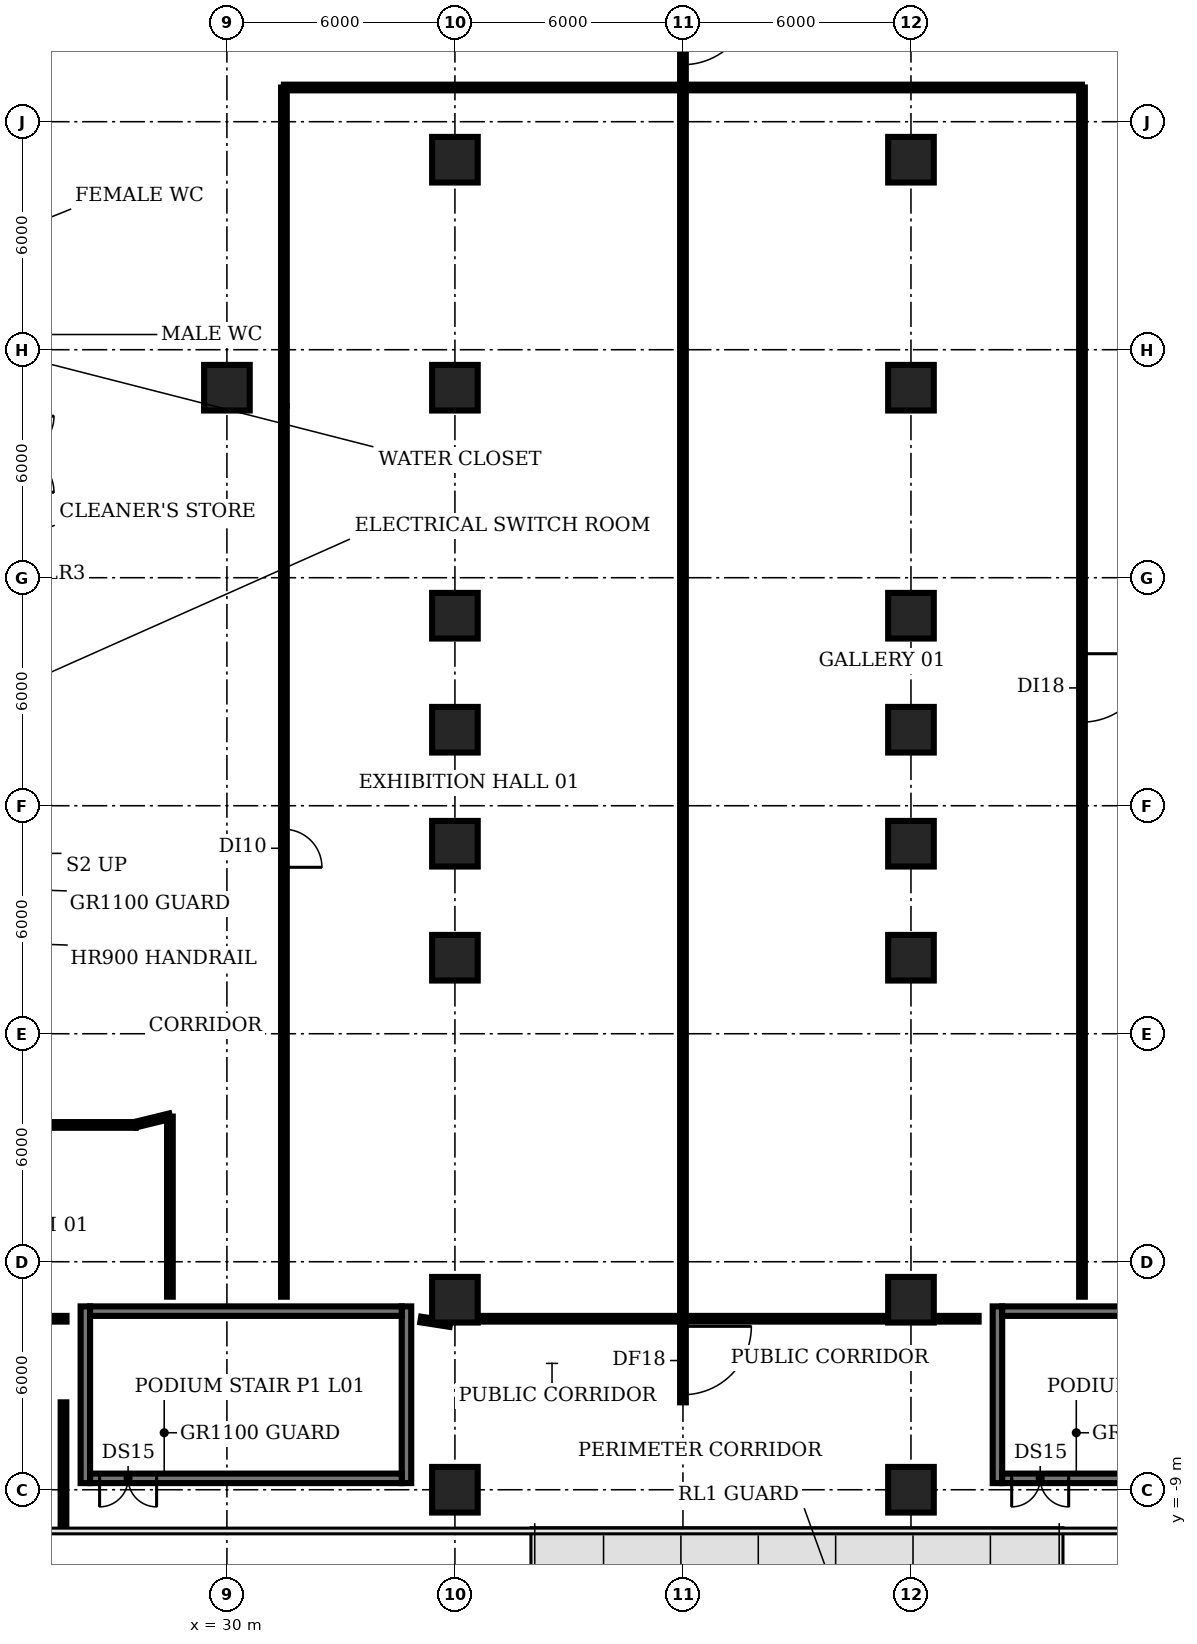
"""IFC4 building model, lengths in metres.
Left out: names, types, materials, properties, quantities, classifications, styles, units other than length and angle.
Written with IfcOpenShell. Run it as: python <this file> out.ifc"""

import sys

from ifc_helpers import new_model, si_unit, direction, frame, frame_2d, origin, origin_2d, place, context, subcontext, project, spatial, rectangle, extrude, element, fill, save


model = new_model("IFC4")
c1 = context("Model", 3, precision=1e-05, world=origin(), true_north=direction((0.0, 1.0)))
c2 = subcontext(c1, "Body", "Model", "MODEL_VIEW")
j1 = project(units=[si_unit("LENGTHUNIT", "METRE"), si_unit("PLANEANGLEUNIT", "RADIAN")], contexts=[c1])
p1 = place(None, origin())
s1 = spatial("IfcSite", under=j1, at=p1, CompositionType="ELEMENT")
p2 = place(p1, origin())
s2 = spatial("IfcBuilding", under=s1, at=p2, CompositionType="ELEMENT")
p3 = place(p2, frame((0.0, 0.0, 6.0)))
s3 = spatial("IfcBuildingStorey", under=s2, at=p3, CompositionType="ELEMENT", Elevation=6.0)
for number, where, z_axis, x_axis in (
    (1, (30.0, 20.0, 0.0), (0.0, 0.0, 1.0), (1.0, 0.0, 0.0)),
    (2, (36.0, -9.0, 0.0), (0.0, 0.0, 1.0), (1.0, 0.0, 0.0)),
    (3, (36.0, -4.0, 0.0), (0.0, 0.0, 1.0), (1.0, 0.0, 0.0)),
    (4, (36.0, 5.0, 0.0), (0.0, 0.0, 1.0), (1.0, 0.0, 0.0)),
    (5, (36.0, 8.0, 0.0), (0.0, 0.0, 1.0), (1.0, 0.0, 0.0)),
    (6, (36.0, 11.0, 0.0), (0.0, 0.0, 1.0), (1.0, 0.0, 0.0)),
    (7, (36.0, 14.0, 0.0), (0.0, 0.0, 1.0), (1.0, 0.0, 0.0)),
    (8, (36.0, 20.0, 0.0), (0.0, 0.0, 1.0), (1.0, 0.0, 0.0)),
    (9, (36.0, 26.0, 0.0), (0.0, 0.0, 1.0), (1.0, 0.0, 0.0)),
    (10, (48.0, -9.0, 0.0), (0.0, 0.0, 1.0), (1.0, 0.0, 0.0)),
    (11, (48.0, -4.0, 0.0), (0.0, 0.0, 1.0), (1.0, 0.0, 0.0)),
    (12, (48.0, 5.0, 0.0), (0.0, 0.0, 1.0), (1.0, 0.0, 0.0)),
    (13, (48.0, 8.0, 0.0), (0.0, 0.0, 1.0), (1.0, 0.0, 0.0)),
    (14, (48.0, 11.0, 0.0), (0.0, 0.0, 1.0), (1.0, 0.0, 0.0)),
    (15, (48.0, 14.0, 0.0), (0.0, 0.0, 1.0), (1.0, 0.0, 0.0)),
    (16, (48.0, 20.0, 0.0), (0.0, 0.0, 1.0), (1.0, 0.0, 0.0)),
    (17, (48.0, 26.0, 0.0), (0.0, 0.0, 1.0), (1.0, 0.0, 0.0)),
):
    element("IfcColumn", number, at=place(p3, frame(where, z_axis=z_axis, x_axis=x_axis)), inside=s3, PredefinedType="COLUMN", context=c2, shape_type="SweptSolid", body=[
        extrude(rectangle(XDim=1.2, YDim=1.2, at=origin_2d()), origin(), (0.0, 0.0, 1.0), 4.6),
    ])
for number, where, z_axis, x_axis in (
    (18, (26.275, -8.825, 0.0), (0.0, 0.0, 1.0), (0.0, 1.0, 0.0)),
    (19, (34.725, -8.825, 0.0), (0.0, 0.0, 1.0), (0.0, 1.0, 0.0)),
):
    element("IfcWall", number, at=place(p3, frame(where, z_axis=z_axis, x_axis=x_axis)), inside=s3, PredefinedType="SHEAR", context=c2, shape_type="SweptSolid", body=[
        extrude(rectangle(XDim=4.65, YDim=0.25, at=frame_2d((2.325, 0.0))), origin(), (0.0, 0.0, 1.0), 4.6),
    ])
p4 = place(p3, frame((34.6, -8.7, 0.0), z_axis=(0.0, 0.0, 1.0), x_axis=(-1.0, 0.0, 0.0)))
e20 = element("IfcWall", 20, at=p4, inside=s3, PredefinedType="SHEAR", context=c2, shape_type="SweptSolid", body=[
    extrude(rectangle(XDim=8.2, YDim=0.25, at=frame_2d((4.1, 0.0))), origin(), (0.0, 0.0, 1.0), 4.6),
])
p5 = place(p4, frame((6.45, 0.0, 0.0)))
e21 = element("IfcOpeningElement", 21, at=p5, cuts=e20, PredefinedType="OPENING", context=c2, shape_type="SweptSolid", body=[
    extrude(rectangle(XDim=1.5, YDim=2.1, at=frame_2d((0.75, 1.05))), frame((0.0, 0.135, 0.0), z_axis=(0.0, -1.0, 0.0), x_axis=(1.0, 0.0, 0.0)), (0.0, 0.0, 1.0), 0.27),
])
p6 = place(p3, frame((26.4, -4.3, 0.0), z_axis=(0.0, 0.0, 1.0), x_axis=(1.0, 0.0, 0.0)))
e22 = element("IfcWall", 22, at=p6, inside=s3, PredefinedType="SHEAR", context=c2, shape_type="SweptSolid", body=[
    extrude(rectangle(XDim=8.2, YDim=0.25, at=frame_2d((4.1, 0.0))), origin(), (0.0, 0.0, 1.0), 4.6),
])
p7 = place(p3, frame((50.275, -8.825, 0.0), z_axis=(0.0, 0.0, 1.0), x_axis=(0.0, 1.0, 0.0)))
e23 = element("IfcWall", 23, at=p7, inside=s3, PredefinedType="SHEAR", context=c2, shape_type="SweptSolid", body=[
    extrude(rectangle(XDim=4.65, YDim=0.25, at=frame_2d((2.325, 0.0))), origin(), (0.0, 0.0, 1.0), 4.6),
])
p8 = place(p3, frame((58.6, -8.7, 0.0), z_axis=(0.0, 0.0, 1.0), x_axis=(-1.0, 0.0, 0.0)))
e24 = element("IfcWall", 24, at=p8, inside=s3, PredefinedType="SHEAR", context=c2, shape_type="SweptSolid", body=[
    extrude(rectangle(XDim=8.2, YDim=0.25, at=frame_2d((4.1, 0.0))), origin(), (0.0, 0.0, 1.0), 4.6),
])
p9 = place(p8, frame((6.45, 0.0, 0.0)))
e25 = element("IfcOpeningElement", 25, at=p9, cuts=e24, PredefinedType="OPENING", context=c2, shape_type="SweptSolid", body=[
    extrude(rectangle(XDim=1.5, YDim=2.1, at=frame_2d((0.75, 1.05))), frame((0.0, 0.135, 0.0), z_axis=(0.0, -1.0, 0.0), x_axis=(1.0, 0.0, 0.0)), (0.0, 0.0, 1.0), 0.27),
])
p10 = place(p3, frame((50.4, -4.3, 0.0), z_axis=(0.0, 0.0, 1.0), x_axis=(1.0, 0.0, 0.0)))
e26 = element("IfcWall", 26, at=p10, inside=s3, PredefinedType="SHEAR", context=c2, shape_type="SweptSolid", body=[
    extrude(rectangle(XDim=8.2, YDim=0.25, at=frame_2d((4.1, 0.0))), origin(), (0.0, 0.0, 1.0), 4.6),
])
p11 = place(p3, frame((24.46, -4.5, 0.0), z_axis=(0.0, 0.0, 1.0), x_axis=(1.0, 0.0, 0.0)))
e27 = element("IfcWall", 27, at=p11, inside=s3, PredefinedType="PARTITIONING", context=c2, shape_type="SweptSolid", body=[
    extrude(rectangle(XDim=1.32, YDim=0.15, at=frame_2d((0.66, 0.0))), origin(), (0.0, 0.0, 1.0), 3.18),
])
p12 = place(p3, frame((25.7, -10.03, 0.0), z_axis=(0.0, 0.0, 1.0), x_axis=(0.0, 1.0, 0.0)))
e28 = element("IfcWall", 28, at=p12, inside=s3, PredefinedType="PARTITIONING", context=c2, shape_type="SweptSolid", body=[
    extrude(rectangle(XDim=3.33, YDim=0.15, at=frame_2d((1.665, 0.0))), origin(), (0.0, 0.0, 1.0), 3.18),
])
p13 = place(p3, frame((27.6, 0.6, 0.0), z_axis=(0.0, 0.0, 1.0), x_axis=(-1.0, 0.0, 0.0)))
e29 = element("IfcWall", 29, at=p13, inside=s3, PredefinedType="PARTITIONING", context=c2, shape_type="SweptSolid", body=[
    extrude(rectangle(XDim=7.1, YDim=0.15, at=frame_2d((3.55, 0.0))), origin(), (0.0, 0.0, 1.0), 3.18),
])
p14 = place(p13, frame((3.0, 0.0, 0.0)))
e30 = element("IfcOpeningElement", 30, at=p14, cuts=e29, PredefinedType="OPENING", context=c2, shape_type="SweptSolid", body=[
    extrude(rectangle(XDim=1.2, YDim=2.1, at=frame_2d((0.6, 1.05))), frame((0.0, 0.085, 0.0), z_axis=(0.0, -1.0, 0.0), x_axis=(1.0, 0.0, 0.0)), (0.0, 0.0, 1.0), 0.17),
])
p15 = place(p3, frame((27.6, 0.61, 0.0), z_axis=(0.0, 0.0, 1.0), x_axis=(0.971400357327, 0.237447564284, 0.0)))
e31 = element("IfcWall", 31, at=p15, inside=s3, PredefinedType="PARTITIONING", context=c2, shape_type="SweptSolid", body=[
    extrude(rectangle(XDim=0.927, YDim=0.15, at=frame_2d((0.463, 0.0))), origin(), (0.0, 0.0, 1.0), 3.18),
])
p16 = place(p3, frame((28.5, -3.92, 0.0), z_axis=(0.0, 0.0, 1.0), x_axis=(0.0, 1.0, 0.0)))
e32 = element("IfcWall", 32, at=p16, inside=s3, PredefinedType="PARTITIONING", context=c2, shape_type="SweptSolid", body=[
    extrude(rectangle(XDim=4.74, YDim=0.15, at=frame_2d((2.37, 0.0))), origin(), (0.0, 0.0, 1.0), 3.18),
])
p17 = place(p3, frame((31.5, 19.52, 0.0), z_axis=(0.0, 0.0, 1.0), x_axis=(0.0, -1.0, 0.0)))
e33 = element("IfcWall", 33, at=p17, inside=s3, PredefinedType="PARTITIONING", context=c2, shape_type="SweptSolid", body=[
    extrude(rectangle(XDim=23.44, YDim=0.15, at=frame_2d((11.72, 0.0))), origin(), (0.0, 0.0, 1.0), 3.18),
])
p18 = place(p17, frame((11.14, 0.0, 0.0)))
e34 = element("IfcOpeningElement", 34, at=p18, cuts=e33, PredefinedType="OPENING", context=c2, shape_type="SweptSolid", body=[
    extrude(rectangle(XDim=1.0, YDim=2.1, at=frame_2d((0.5, 1.05))), frame((0.0, 0.085, 0.0), z_axis=(0.0, -1.0, 0.0), x_axis=(1.0, 0.0, 0.0)), (0.0, 0.0, 1.0), 0.17),
])
p19 = place(p3, frame((31.5, 19.52, 0.0), z_axis=(0.0, 0.0, 1.0), x_axis=(0.0, 1.0, 0.0)))
e35 = element("IfcWall", 35, at=p19, inside=s3, PredefinedType="PARTITIONING", context=c2, shape_type="SweptSolid", body=[
    extrude(rectangle(XDim=8.38, YDim=0.15, at=frame_2d((4.19, 0.0))), origin(), (0.0, 0.0, 1.0), 3.18),
])
p20 = place(p3, frame((31.5, 27.9, 0.0), z_axis=(0.0, 0.0, 1.0), x_axis=(1.0, 0.0, 0.0)))
e36 = element("IfcWall", 36, at=p20, inside=s3, PredefinedType="PARTITIONING", context=c2, shape_type="SweptSolid", body=[
    extrude(rectangle(XDim=21.0, YDim=0.15, at=frame_2d((10.5, 0.0))), origin(), (0.0, 0.0, 1.0), 3.18),
])
p21 = place(p3, frame((35.1, -4.52, 0.0), z_axis=(0.0, 0.0, 1.0), x_axis=(0.988098486873, -0.153822560892, 0.0)))
e37 = element("IfcWall", 37, at=p21, inside=s3, PredefinedType="PARTITIONING", context=c2, shape_type="SweptSolid", body=[
    extrude(rectangle(XDim=0.779, YDim=0.15, at=frame_2d((0.39, 0.0))), origin(), (0.0, 0.0, 1.0), 3.18),
])
p22 = place(p3, frame((36.46, -4.5, 0.0), z_axis=(0.0, 0.0, 1.0), x_axis=(1.0, 0.0, 0.0)))
e38 = element("IfcWall", 38, at=p22, inside=s3, PredefinedType="PARTITIONING", context=c2, shape_type="SweptSolid", body=[
    extrude(rectangle(XDim=11.08, YDim=0.15, at=frame_2d((5.54, 0.0))), origin(), (0.0, 0.0, 1.0), 3.18),
])
p23 = place(p3, frame((42.0, -4.5, 0.0), z_axis=(0.0, 0.0, 1.0), x_axis=(0.0, -1.0, 0.0)))
e39 = element("IfcWall", 39, at=p23, inside=s3, PredefinedType="PARTITIONING", context=c2, shape_type="SweptSolid", body=[
    extrude(rectangle(XDim=2.2, YDim=0.15, at=frame_2d((1.1, 0.0))), origin(), (0.0, 0.0, 1.0), 3.18),
])
p24 = place(p23, frame((0.2, 0.0, 0.0)))
e40 = element("IfcOpeningElement", 40, at=p24, cuts=e39, PredefinedType="OPENING", context=c2, shape_type="SweptSolid", body=[
    extrude(rectangle(XDim=1.8, YDim=2.1, at=frame_2d((0.9, 1.05))), frame((0.0, 0.085, 0.0), z_axis=(0.0, -1.0, 0.0), x_axis=(1.0, 0.0, 0.0)), (0.0, 0.0, 1.0), 0.17),
])
p25 = place(p3, frame((42.0, -4.5, 0.0), z_axis=(0.0, 0.0, 1.0), x_axis=(0.0, 1.0, 0.0)))
e41 = element("IfcWall", 41, at=p25, inside=s3, PredefinedType="PARTITIONING", context=c2, shape_type="SweptSolid", body=[
    extrude(rectangle(XDim=32.4, YDim=0.15, at=frame_2d((16.2, 0.0))), origin(), (0.0, 0.0, 1.0), 3.18),
])
p26 = place(p3, frame((42.0, 30.9, 0.0), z_axis=(0.0, 0.0, 1.0), x_axis=(0.0, -1.0, 0.0)))
e42 = element("IfcWall", 42, at=p26, inside=s3, PredefinedType="PARTITIONING", context=c2, shape_type="SweptSolid", body=[
    extrude(rectangle(XDim=3.0, YDim=0.15, at=frame_2d((1.5, 0.0))), origin(), (0.0, 0.0, 1.0), 3.18),
])
p27 = place(p26, frame((0.6, 0.0, 0.0)))
e43 = element("IfcOpeningElement", 43, at=p27, cuts=e42, PredefinedType="OPENING", context=c2, shape_type="SweptSolid", body=[
    extrude(rectangle(XDim=1.8, YDim=2.1, at=frame_2d((0.9, 1.05))), frame((0.0, 0.085, 0.0), z_axis=(0.0, -1.0, 0.0), x_axis=(1.0, 0.0, 0.0)), (0.0, 0.0, 1.0), 0.17),
])
p28 = place(p3, frame((48.46, -4.5, 0.0), z_axis=(0.0, 0.0, 1.0), x_axis=(1.0, 0.0, 0.0)))
e44 = element("IfcWall", 44, at=p28, inside=s3, PredefinedType="PARTITIONING", context=c2, shape_type="SweptSolid", body=[
    extrude(rectangle(XDim=1.32, YDim=0.15, at=frame_2d((0.66, 0.0))), origin(), (0.0, 0.0, 1.0), 3.18),
])
p29 = place(p3, frame((52.5, 27.9, 0.0), z_axis=(0.0, 0.0, 1.0), x_axis=(0.0, -1.0, 0.0)))
e45 = element("IfcWall", 45, at=p29, inside=s3, PredefinedType="PARTITIONING", context=c2, shape_type="SweptSolid", body=[
    extrude(rectangle(XDim=31.82, YDim=0.15, at=frame_2d((15.91, 0.0))), origin(), (0.0, 0.0, 1.0), 3.18),
])
p30 = place(p29, frame((14.9, 0.0, 0.0)))
e46 = element("IfcOpeningElement", 46, at=p30, cuts=e45, PredefinedType="OPENING", context=c2, shape_type="SweptSolid", body=[
    extrude(rectangle(XDim=1.8, YDim=2.1, at=frame_2d((0.9, 1.05))), frame((0.0, 0.085, 0.0), z_axis=(0.0, -1.0, 0.0), x_axis=(1.0, 0.0, 0.0)), (0.0, 0.0, 1.0), 0.17),
])
p31 = place(p5, origin())
e47 = element("IfcDoor", 47, at=p31, inside=s3, OperationType="DOUBLE_DOOR_SINGLE_SWING", PredefinedType="DOOR", context=c2, shape_type="SweptSolid", body=[
    extrude(rectangle(XDim=1.5, YDim=2.1, at=frame_2d((0.75, 1.05))), frame((0.0, 0.025, 0.0), z_axis=(0.0, -1.0, 0.0), x_axis=(1.0, 0.0, 0.0)), (0.0, 0.0, 1.0), 0.05),
])
fill(e21, e47)
p32 = place(p9, origin())
e48 = element("IfcDoor", 48, at=p32, inside=s3, OperationType="DOUBLE_DOOR_SINGLE_SWING", PredefinedType="DOOR", context=c2, shape_type="SweptSolid", body=[
    extrude(rectangle(XDim=1.5, YDim=2.1, at=frame_2d((0.75, 1.05))), frame((0.0, 0.025, 0.0), z_axis=(0.0, -1.0, 0.0), x_axis=(1.0, 0.0, 0.0)), (0.0, 0.0, 1.0), 0.05),
])
fill(e25, e48)
p33 = place(p18, origin())
e49 = element("IfcDoor", 49, at=p33, inside=s3, OperationType="SINGLE_SWING_RIGHT", PredefinedType="DOOR", context=c2, shape_type="SweptSolid", body=[
    extrude(rectangle(XDim=1.0, YDim=2.1, at=frame_2d((0.5, 1.05))), frame((0.0, 0.025, 0.0), z_axis=(0.0, -1.0, 0.0), x_axis=(1.0, 0.0, 0.0)), (0.0, 0.0, 1.0), 0.05),
])
fill(e34, e49)
p34 = place(p24, origin())
e50 = element("IfcDoor", 50, at=p34, inside=s3, OperationType="SINGLE_SWING_LEFT", PredefinedType="DOOR", context=c2, shape_type="SweptSolid", body=[
    extrude(rectangle(XDim=1.8, YDim=2.1, at=frame_2d((0.9, 1.05))), frame((0.0, 0.025, 0.0), z_axis=(0.0, -1.0, 0.0), x_axis=(1.0, 0.0, 0.0)), (0.0, 0.0, 1.0), 0.05),
])
fill(e40, e50)
p35 = place(p27, origin())
e51 = element("IfcDoor", 51, at=p35, inside=s3, OperationType="SINGLE_SWING_LEFT", PredefinedType="DOOR", context=c2, shape_type="SweptSolid", body=[
    extrude(rectangle(XDim=1.8, YDim=2.1, at=frame_2d((0.9, 1.05))), frame((0.0, 0.025, 0.0), z_axis=(0.0, -1.0, 0.0), x_axis=(1.0, 0.0, 0.0)), (0.0, 0.0, 1.0), 0.05),
])
fill(e43, e51)
p36 = place(p30, origin())
e52 = element("IfcDoor", 52, at=p36, inside=s3, OperationType="SINGLE_SWING_LEFT", PredefinedType="DOOR", context=c2, shape_type="SweptSolid", body=[
    extrude(rectangle(XDim=1.8, YDim=2.1, at=frame_2d((0.9, 1.05))), frame((0.0, 0.025, 0.0), z_axis=(0.0, -1.0, 0.0), x_axis=(1.0, 0.0, 0.0)), (0.0, 0.0, 1.0), 0.05),
])
fill(e46, e52)
save(model, sys.argv[1])
